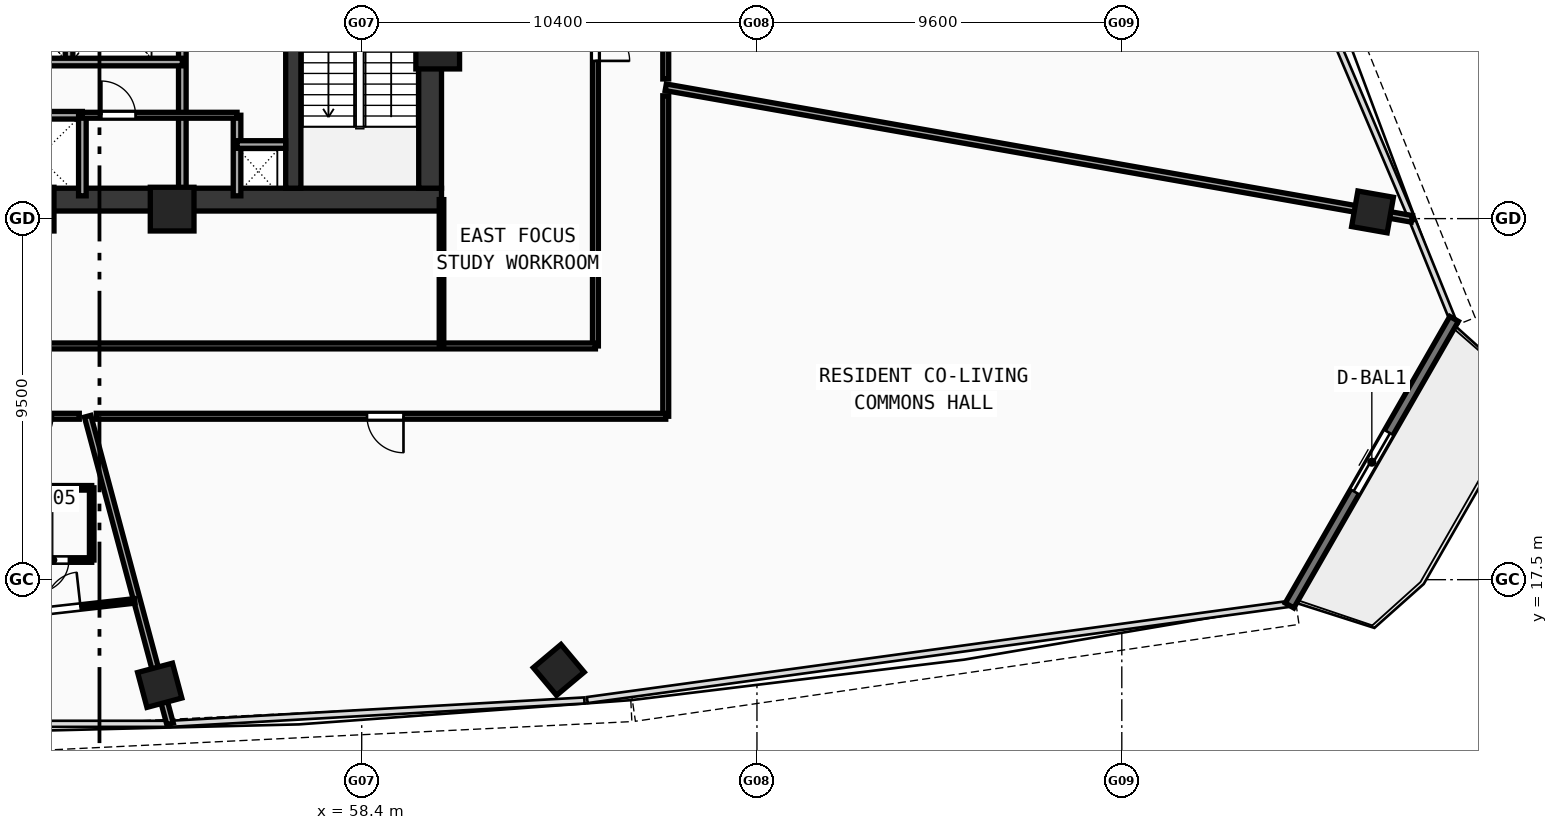
"""IFC4 building model, lengths in metres.
Left out: names, types, materials, properties, quantities, classifications, styles, units other than length and angle.
Written with IfcOpenShell. Run it as: python <this file> out.ifc"""

import sys

from ifc_helpers import new_model, si_unit, direction, frame, frame_2d, origin, origin_with_axes, origin_2d, place, context, subcontext, project, spatial, rectangle, hollow_rectangle, extrude, source, transform, mapped, element, fill, save


model = new_model("IFC4")
c1 = context("Model", 3, precision=1e-05, world=origin(), true_north=direction((0.0, 1.0)))
c2 = subcontext(c1, "Body", "Model", "MODEL_VIEW")
j1 = project(units=[si_unit("LENGTHUNIT", "METRE"), si_unit("PLANEANGLEUNIT", "RADIAN")], contexts=[c1])
p1 = place(None, origin())
s1 = spatial("IfcSite", under=j1, at=p1, CompositionType="ELEMENT")
p2 = place(p1, origin())
s2 = spatial("IfcBuilding", under=s1, at=p2, CompositionType="ELEMENT")
p3 = place(p2, frame((0.0, 0.0, 170.31)))
s3 = spatial("IfcBuildingStorey", under=s2, at=p3, CompositionType="ELEMENT", Elevation=170.31)
p4 = place(p3, frame((35.5, 27.5, 0.0), z_axis=(0.0, 0.0, 1.0), x_axis=(1.0, 0.0, 0.0)))
e1 = element("IfcWall", 1, at=p4, inside=s3, PredefinedType="SHEAR", context=c2, shape_type="SweptSolid", body=[
    extrude(rectangle(XDim=25.0, YDim=0.6, at=frame_2d((12.5, 0.0))), origin(), (0.0, 0.0, 1.0), 5.57),
])
p5 = place(p3, frame((60.2, 27.8, 0.0), z_axis=(0.0, 0.0, 1.0), x_axis=(0.0, 1.0, 0.0)))
e2 = element("IfcWall", 2, at=p5, inside=s3, PredefinedType="SHEAR", context=c2, shape_type="SweptSolid", body=[
    extrude(rectangle(XDim=12.1, YDim=0.6, at=frame_2d((6.05, 0.0))), origin(), (0.0, 0.0, 1.0), 5.57),
])
p6 = place(p3, frame((56.6, 27.8, 0.0), z_axis=(0.0, 0.0, 1.0), x_axis=(0.0, 1.0, 0.0)))
e3 = element("IfcWall", 3, at=p6, inside=s3, PredefinedType="SHEAR", context=c2, shape_type="SweptSolid", body=[
    extrude(rectangle(XDim=12.1, YDim=0.4, at=frame_2d((6.05, 0.0))), origin(), (0.0, 0.0, 1.0), 5.57),
])
p7 = place(p6, frame((9.95, 0.0, 0.0)))
e4 = element("IfcOpeningElement", 4, at=p7, cuts=e3, PredefinedType="OPENING", context=c2, shape_type="SweptSolid", body=[
    extrude(rectangle(XDim=1.1, YDim=2.1, at=frame_2d((0.55, 1.05))), frame((0.0, 0.21, 0.0), z_axis=(0.0, -1.0, 0.0), x_axis=(1.0, 0.0, 0.0)), (0.0, 0.0, 1.0), 0.42),
])
m1 = source(origin(), c2, "Body", "SweptSolid", [
    extrude(hollow_rectangle(XDim=1.15, YDim=1.15, WallThickness=0.048, at=origin_2d()), origin(), (0.0, 0.0, 1.0), 5.83),
])
for number, where, z_axis, x_axis in (
    (5, (49.729, 27.25, -0.26), (0.0, 0.0, 1.0), (1.0, 0.0, 0.0)),
    (6, (53.412, 27.25, -0.26), (0.0, 0.0, 1.0), (1.0, 0.0, 0.0)),
    (7, (60.4, 31.513, -0.26), (0.0, 0.0, 1.0), (1.0, 0.0, 0.0)),
):
    element("IfcColumn", number, at=place(p3, frame(where, z_axis=z_axis, x_axis=x_axis)), inside=s3, PredefinedType="COLUMN", context=c2, shape_type="MappedRepresentation", body=[
        mapped(m1, transform((0.0, 0.0, 0.0), scale=1.0)),
    ])
m2 = source(origin(), c2, "Body", "SweptSolid", [
    extrude(hollow_rectangle(XDim=0.95, YDim=0.95, WallThickness=0.04, at=origin_2d()), origin(), (0.0, 0.0, 1.0), 5.83),
])
for number, where, z_axis, x_axis in (
    (8, (53.085, 14.722, -0.26), (0.0, 0.0, 1.0), (0.966, 0.259, 0.0)),
    (9, (63.585, 15.126, -0.26), (0.0, 0.0, 1.0), (0.766, 0.643, 0.0)),
    (10, (84.997, 27.177, -0.26), (0.0, 0.0, 1.0), (0.174, 0.985, 0.0)),
):
    element("IfcColumn", number, at=place(p3, frame(where, z_axis=z_axis, x_axis=x_axis)), inside=s3, PredefinedType="COLUMN", context=c2, shape_type="MappedRepresentation", body=[
        mapped(m2, transform((0.0, 0.0, 0.0), scale=1.0)),
    ])
p8 = place(p3, frame((82.814, 16.821, 0.0), z_axis=(0.0, 0.0, 1.0), x_axis=(0.497939858886, 0.867211564114, 0.0)))
e11 = element("IfcWall", 11, at=p8, inside=s3, PredefinedType="STANDARD", context=c2, shape_type="SweptSolid", body=[
    extrude(rectangle(XDim=8.696, YDim=0.26, at=frame_2d((4.348, 0.0))), origin(), (0.0, 0.0, 1.0), 5.57),
])
p9 = place(p8, frame((3.448, 0.0, 0.0)))
e12 = element("IfcOpeningElement", 12, at=p9, cuts=e11, PredefinedType="OPENING", context=c2, shape_type="SweptSolid", body=[
    extrude(rectangle(XDim=1.8, YDim=2.15, at=frame_2d((0.9, 1.075))), frame((0.0, 0.14, 0.0), z_axis=(0.0, -1.0, 0.0), x_axis=(1.0, 0.0, 0.0)), (0.0, 0.0, 1.0), 0.28),
])
p10 = place(p3, frame((53.68, 27.6, 0.0), z_axis=(0.0, 0.0, 1.0), x_axis=(0.0, 1.0, 0.0)))
e13 = element("IfcWall", 13, at=p10, inside=s3, PredefinedType="SOLIDWALL", context=c2, shape_type="SweptSolid", body=[
    extrude(rectangle(XDim=9.05, YDim=0.2, at=frame_2d((4.525, 0.0))), origin(), (0.0, 0.0, 1.0), 2.22),
])
p11 = place(p10, frame((6.9, 0.0, 0.0)))
e14 = element("IfcOpeningElement", 14, at=p11, cuts=e13, PredefinedType="OPENING", context=c2, shape_type="SweptSolid", body=[
    extrude(rectangle(XDim=1.05, YDim=2.1, at=frame_2d((0.525, 1.05))), frame((0.0, 0.11, 0.0), z_axis=(0.0, -1.0, 0.0), x_axis=(1.0, 0.0, 0.0)), (0.0, 0.0, 1.0), 0.22),
])
p12 = place(p3, frame((50.7, 31.12, 0.0), z_axis=(0.0, 0.0, 1.0), x_axis=(0.0, 1.0, 0.0)))
e15 = element("IfcWall", 15, at=p12, inside=s3, PredefinedType="SOLIDWALL", context=c2, shape_type="SweptSolid", body=[
    extrude(rectangle(XDim=2.7, YDim=0.2, at=frame_2d((1.35, 0.0))), origin(), (0.0, 0.0, 1.0), 5.57),
])
p13 = place(p3, frame((43.85, 29.72, 0.0), z_axis=(0.0, 0.0, 1.0), x_axis=(1.0, 0.0, 0.0)))
e16 = element("IfcWall", 16, at=p13, inside=s3, PredefinedType="SOLIDWALL", context=c2, shape_type="SweptSolid", body=[
    extrude(rectangle(XDim=7.2, YDim=0.2, at=frame_2d((3.6, 0.0))), origin(), (0.0, 0.0, 1.0), 5.57),
])
p14 = place(p3, frame((51.05, 27.6, 0.0), z_axis=(0.0, 0.0, 1.0), x_axis=(0.0, 1.0, 0.0)))
e17 = element("IfcWall", 17, at=p14, inside=s3, PredefinedType="SOLIDWALL", context=c2, shape_type="SweptSolid", body=[
    extrude(rectangle(XDim=2.12, YDim=0.2, at=frame_2d((1.06, 0.0))), origin(), (0.0, 0.0, 1.0), 5.57),
])
p15 = place(p3, frame((43.85, 31.12, 0.0), z_axis=(0.0, 0.0, 1.0), x_axis=(1.0, 0.0, 0.0)))
e18 = element("IfcWall", 18, at=p15, inside=s3, PredefinedType="SOLIDWALL", context=c2, shape_type="SweptSolid", body=[
    extrude(rectangle(XDim=9.83, YDim=0.2, at=frame_2d((4.915, 0.0))), origin(), (0.0, 0.0, 1.0), 5.57),
])
p16 = place(p3, frame((55.12, 27.6, 0.0), z_axis=(0.0, 0.0, 1.0), x_axis=(0.0, 1.0, 0.0)))
e19 = element("IfcWall", 19, at=p16, inside=s3, PredefinedType="SOLIDWALL", context=c2, shape_type="SweptSolid", body=[
    extrude(rectangle(XDim=2.12, YDim=0.2, at=frame_2d((1.06, 0.0))), origin(), (0.0, 0.0, 1.0), 5.57),
])
p17 = place(p3, frame((55.12, 28.95, 0.0), z_axis=(0.0, 0.0, 1.0), x_axis=(1.0, 0.0, 0.0)))
e20 = element("IfcWall", 20, at=p17, inside=s3, PredefinedType="SOLIDWALL", context=c2, shape_type="SweptSolid", body=[
    extrude(rectangle(XDim=1.28, YDim=0.2, at=frame_2d((0.64, 0.0))), origin(), (0.0, 0.0, 1.0), 5.57),
])
p18 = place(p3, frame((51.05, 29.72, 0.0), z_axis=(0.0, 0.0, 1.0), x_axis=(1.0, 0.0, 0.0)))
e21 = element("IfcWall", 21, at=p18, inside=s3, PredefinedType="PARTITIONING", context=c2, shape_type="SweptSolid", body=[
    extrude(rectangle(XDim=4.07, YDim=0.155, at=frame_2d((2.035, 0.0))), origin(), (0.0, 0.0, 1.0), 5.57),
])
p19 = place(p18, frame((0.5, 0.0, 0.0)))
e22 = element("IfcOpeningElement", 22, at=p19, cuts=e21, PredefinedType="OPENING", context=c2, shape_type="SweptSolid", body=[
    extrude(rectangle(XDim=0.9, YDim=2.1, at=frame_2d((0.45, 1.05))), frame((0.0, 0.087, 0.0), z_axis=(0.0, -1.0, 0.0), x_axis=(1.0, 0.0, 0.0)), (0.0, 0.0, 1.0), 0.175),
])
p20 = place(p3, frame((64.55, 23.65, 0.0), z_axis=(0.0, 0.0, 1.0), x_axis=(0.0, 1.0, 0.0)))
e23 = element("IfcWall", 23, at=p20, inside=s3, PredefinedType="PARTITIONING", context=c2, shape_type="SweptSolid", body=[
    extrude(rectangle(XDim=16.6, YDim=0.155, at=frame_2d((8.3, 0.0))), origin(), (0.0, 0.0, 1.0), 2.22),
])
p21 = place(p20, frame((7.5, 0.0, 0.0)))
e24 = element("IfcOpeningElement", 24, at=p21, cuts=e23, PredefinedType="OPENING", context=c2, shape_type="SweptSolid", body=[
    extrude(rectangle(XDim=0.9, YDim=2.08, at=frame_2d((0.45, 1.04))), frame((0.0, 0.087, 0.0), z_axis=(0.0, -1.0, 0.0), x_axis=(1.0, 0.0, 0.0)), (0.0, 0.0, 1.0), 0.175),
])
p22 = place(p3, frame((31.45, 23.65, 0.0), z_axis=(0.0, 0.0, 1.0), x_axis=(1.0, 0.0, 0.0)))
e25 = element("IfcWall", 25, at=p22, inside=s3, PredefinedType="PARTITIONING", context=c2, shape_type="SweptSolid", body=[
    extrude(rectangle(XDim=33.1, YDim=0.155, at=frame_2d((16.55, 0.0))), origin(), (0.0, 0.0, 1.0), 2.22),
])
p23 = place(p22, frame((16.0, 0.0, 0.0)))
e26 = element("IfcOpeningElement", 26, at=p23, cuts=e25, PredefinedType="OPENING", context=c2, shape_type="SweptSolid", body=[
    extrude(rectangle(XDim=0.92, YDim=2.1, at=frame_2d((0.46, 1.05))), frame((0.0, 0.087, 0.0), z_axis=(0.0, -1.0, 0.0), x_axis=(1.0, 0.0, 0.0)), (0.0, 0.0, 1.0), 0.175),
])
p24 = place(p3, frame((60.5, 23.65, 0.0), z_axis=(0.0, 0.0, 1.0), x_axis=(0.0, 1.0, 0.0)))
e27 = element("IfcWall", 27, at=p24, inside=s3, PredefinedType="PARTITIONING", context=c2, shape_type="SweptSolid", body=[
    extrude(rectangle(XDim=3.85, YDim=0.12, at=frame_2d((1.925, 0.0))), origin(), (0.0, 0.0, 1.0), 5.17),
])
p25 = place(p3, frame((51.189, 21.8, 0.0), z_axis=(0.0, 0.0, 1.0), x_axis=(0.258819593461, -0.965925679357, 0.0)))
e28 = element("IfcWall", 28, at=p25, inside=s3, PredefinedType="PARTITIONING", context=c2, shape_type="SweptSolid", body=[
    extrude(rectangle(XDim=8.378, YDim=0.175, at=frame_2d((4.189, 0.0))), origin(), (0.0, 0.0, 1.0), 2.22),
])
p26 = place(p3, frame((66.4, 30.456, 0.0), z_axis=(0.0, 0.0, 1.0), x_axis=(0.984808700761, -0.173642802629, 0.0)))
e29 = element("IfcWall", 29, at=p26, inside=s3, PredefinedType="PARTITIONING", context=c2, shape_type="SweptSolid", body=[
    extrude(rectangle(XDim=19.934, YDim=0.175, at=frame_2d((9.967, 0.0))), origin(), (0.0, 0.0, 1.0), 2.22),
])
p27 = place(p3, frame((66.4, 34.767, 0.0), z_axis=(0.0, 0.0, 1.0), x_axis=(0.0, -1.0, 0.0)))
e30 = element("IfcWall", 30, at=p27, inside=s3, PredefinedType="PARTITIONING", context=c2, shape_type="SweptSolid", body=[
    extrude(rectangle(XDim=4.092, YDim=0.155, at=frame_2d((2.046, 0.0))), origin(), (0.0, 0.0, 1.0), 2.22),
])
p28 = place(p27, frame((1.571, 0.0, 0.0)))
e31 = element("IfcOpeningElement", 31, at=p28, cuts=e30, PredefinedType="OPENING", context=c2, shape_type="SweptSolid", body=[
    extrude(rectangle(XDim=0.96, YDim=2.12, at=frame_2d((0.48, 1.06))), frame((0.0, 0.087, 0.0), z_axis=(0.0, -1.0, 0.0), x_axis=(1.0, 0.0, 0.0)), (0.0, 0.0, 1.0), 0.175),
])
p29 = place(p3, frame((66.4, 30.232, 0.0), z_axis=(0.0, 0.0, 1.0), x_axis=(0.0, -1.0, 0.0)))
e32 = element("IfcWall", 32, at=p29, inside=s3, PredefinedType="PARTITIONING", context=c2, shape_type="SweptSolid", body=[
    extrude(rectangle(XDim=8.432, YDim=0.155, at=frame_2d((4.216, 0.0))), origin(), (0.0, 0.0, 1.0), 2.22),
])
p30 = place(p3, frame((66.4, 21.8, 0.0), z_axis=(0.0, 0.0, 1.0), x_axis=(-1.0, 0.0, 0.0)))
e33 = element("IfcWall", 33, at=p30, inside=s3, PredefinedType="PARTITIONING", context=c2, shape_type="SweptSolid", body=[
    extrude(rectangle(XDim=14.983, YDim=0.155, at=frame_2d((7.492, 0.0))), origin(), (0.0, 0.0, 1.0), 2.22),
])
p31 = place(p30, frame((6.901, 0.0, 0.0)))
e34 = element("IfcOpeningElement", 34, at=p31, cuts=e33, PredefinedType="OPENING", context=c2, shape_type="SweptSolid", body=[
    extrude(rectangle(XDim=0.96, YDim=2.12, at=frame_2d((0.48, 1.06))), frame((0.0, 0.087, 0.0), z_axis=(0.0, -1.0, 0.0), x_axis=(1.0, 0.0, 0.0)), (0.0, 0.0, 1.0), 0.175),
])
p32 = place(p3, frame((50.969, 21.8, 0.0), z_axis=(0.0, 0.0, 1.0), x_axis=(-1.0, 0.0, 0.0)))
e35 = element("IfcWall", 35, at=p32, inside=s3, PredefinedType="PARTITIONING", context=c2, shape_type="SweptSolid", body=[
    extrude(rectangle(XDim=2.333, YDim=0.155, at=frame_2d((1.167, 0.0))), origin(), (0.0, 0.0, 1.0), 2.22),
])
p33 = place(p32, frame((0.692, 0.0, 0.0)))
e36 = element("IfcOpeningElement", 36, at=p33, cuts=e35, PredefinedType="OPENING", context=c2, shape_type="SweptSolid", body=[
    extrude(rectangle(XDim=0.96, YDim=2.12, at=frame_2d((0.48, 1.06))), frame((0.0, 0.087, 0.0), z_axis=(0.0, -1.0, 0.0), x_axis=(1.0, 0.0, 0.0)), (0.0, 0.0, 1.0), 0.175),
])
p34 = place(p3, frame((49.246, 18.017, 0.0), z_axis=(0.0, 0.0, 1.0), x_axis=(1.0, 0.0, 0.0)))
e37 = element("IfcWall", 37, at=p34, inside=s3, PredefinedType="PARTITIONING", context=c2, shape_type="SweptSolid", body=[
    extrude(rectangle(XDim=2.05, YDim=0.12, at=frame_2d((1.025, 0.0))), origin(), (0.0, 0.0, 1.0), 5.57),
])
p35 = place(p34, frame((0.6, 0.0, 0.0)))
e38 = element("IfcOpeningElement", 38, at=p35, cuts=e37, PredefinedType="OPENING", context=c2, shape_type="SweptSolid", body=[
    extrude(rectangle(XDim=0.85, YDim=2.1, at=frame_2d((0.425, 1.05))), frame((0.0, 0.07, 0.0), z_axis=(0.0, -1.0, 0.0), x_axis=(1.0, 0.0, 0.0)), (0.0, 0.0, 1.0), 0.14),
])
p36 = place(p3, frame((51.296, 18.017, 0.0), z_axis=(0.0, 0.0, 1.0), x_axis=(0.0, 1.0, 0.0)))
e39 = element("IfcWall", 39, at=p36, inside=s3, PredefinedType="PARTITIONING", context=c2, shape_type="SweptSolid", body=[
    extrude(rectangle(XDim=1.9, YDim=0.12, at=frame_2d((0.95, 0.0))), origin(), (0.0, 0.0, 1.0), 2.22),
])
p37 = place(p3, frame((51.296, 19.917, 0.0), z_axis=(0.0, 0.0, 1.0), x_axis=(-1.0, 0.0, 0.0)))
e40 = element("IfcWall", 40, at=p37, inside=s3, PredefinedType="PARTITIONING", context=c2, shape_type="SweptSolid", body=[
    extrude(rectangle(XDim=2.05, YDim=0.12, at=frame_2d((1.025, 0.0))), origin(), (0.0, 0.0, 1.0), 2.22),
])
p38 = place(p3, frame((48.66, 16.518, 0.0), z_axis=(0.0, 0.0, 1.0), x_axis=(0.993740790244, 0.111710526829, 0.0)))
e41 = element("IfcWall", 41, at=p38, inside=s3, PredefinedType="PARTITIONING", context=c2, shape_type="SweptSolid", body=[
    extrude(rectangle(XDim=3.792, YDim=0.12, at=frame_2d((1.896, 0.0))), origin(), (0.0, 0.0, 1.0), 2.22),
])
p39 = place(p38, frame((1.436, 0.0, 0.0)))
e42 = element("IfcOpeningElement", 42, at=p39, cuts=e41, PredefinedType="OPENING", context=c2, shape_type="SweptSolid", body=[
    extrude(rectangle(XDim=0.92, YDim=2.1, at=frame_2d((0.46, 1.05))), frame((0.0, 0.07, 0.0), z_axis=(0.0, -1.0, 0.0), x_axis=(1.0, 0.0, 0.0)), (0.0, 0.0, 1.0), 0.14),
])
m3 = source(origin(), c2, "Body", "SweptSolid", [
    extrude(rectangle(XDim=1.8, YDim=2.15, at=frame_2d((0.9, 1.075))), frame((0.0, 0.025, 0.0), z_axis=(0.0, -1.0, 0.0), x_axis=(1.0, 0.0, 0.0)), (0.0, 0.0, 1.0), 0.05),
])
p40 = place(p9, origin_with_axes())
e43 = element("IfcDoor", 43, at=p40, inside=s3, OperationType="DOUBLE_DOOR_SLIDING", PredefinedType="DOOR", context=c2, shape_type="MappedRepresentation", body=[
    mapped(m3, transform((0.0, 0.0, 0.0), scale=1.0)),
])
fill(e12, e43)
m4 = source(origin(), c2, "Body", "SweptSolid", [
    extrude(rectangle(XDim=0.9, YDim=2.1, at=frame_2d((0.45, 1.05))), frame((0.0, 0.025, 0.0), z_axis=(0.0, -1.0, 0.0), x_axis=(1.0, 0.0, 0.0)), (0.0, 0.0, 1.0), 0.05),
])
p41 = place(p19, origin_with_axes())
e44 = element("IfcDoor", 44, at=p41, inside=s3, OperationType="SINGLE_SWING_LEFT", PredefinedType="DOOR", context=c2, shape_type="MappedRepresentation", body=[
    mapped(m4, transform((0.0, 0.0, 0.0), scale=1.0)),
])
fill(e22, e44)
m5 = source(origin(), c2, "Body", "SweptSolid", [
    extrude(rectangle(XDim=0.9, YDim=2.08, at=frame_2d((0.45, 1.04))), frame((0.0, 0.025, 0.0), z_axis=(0.0, -1.0, 0.0), x_axis=(1.0, 0.0, 0.0)), (0.0, 0.0, 1.0), 0.05),
])
p42 = place(p21, frame((0.9, 0.0, 0.0), z_axis=(0.0, 0.0, 1.0), x_axis=(-1.0, 0.0, 0.0)))
e45 = element("IfcDoor", 45, at=p42, inside=s3, OperationType="SINGLE_SWING_RIGHT", PredefinedType="DOOR", context=c2, shape_type="MappedRepresentation", body=[
    mapped(m5, transform((0.0, 0.0, 0.0), scale=1.0)),
])
fill(e24, e45)
m6 = source(origin(), c2, "Body", "SweptSolid", [
    extrude(rectangle(XDim=0.96, YDim=2.12, at=frame_2d((0.48, 1.06))), frame((0.0, 0.025, 0.0), z_axis=(0.0, -1.0, 0.0), x_axis=(1.0, 0.0, 0.0)), (0.0, 0.0, 1.0), 0.05),
])
p43 = place(p33, origin_with_axes())
e46 = element("IfcDoor", 46, at=p43, inside=s3, OperationType="SINGLE_SWING_RIGHT", PredefinedType="DOOR", context=c2, shape_type="MappedRepresentation", body=[
    mapped(m6, transform((0.0, 0.0, 0.0), scale=1.0)),
])
fill(e36, e46)
m7 = source(origin(), c2, "Body", "SweptSolid", [
    extrude(rectangle(XDim=0.85, YDim=2.1, at=frame_2d((0.425, 1.05))), frame((0.0, 0.025, 0.0), z_axis=(0.0, -1.0, 0.0), x_axis=(1.0, 0.0, 0.0)), (0.0, 0.0, 1.0), 0.05),
])
p44 = place(p35, frame((0.85, 0.0, 0.0), z_axis=(0.0, 0.0, 1.0), x_axis=(-1.0, 0.0, 0.0)))
e47 = element("IfcDoor", 47, at=p44, inside=s3, OperationType="SINGLE_SWING_RIGHT", PredefinedType="DOOR", context=c2, shape_type="MappedRepresentation", body=[
    mapped(m7, transform((0.0, 0.0, 0.0), scale=1.0)),
])
fill(e38, e47)
m8 = source(origin(), c2, "Body", "SweptSolid", [
    extrude(rectangle(XDim=0.92, YDim=2.1, at=frame_2d((0.46, 1.05))), frame((0.0, 0.025, 0.0), z_axis=(0.0, -1.0, 0.0), x_axis=(1.0, 0.0, 0.0)), (0.0, 0.0, 1.0), 0.05),
])
p45 = place(p39, origin_with_axes())
e48 = element("IfcDoor", 48, at=p45, inside=s3, OperationType="SINGLE_SWING_RIGHT", PredefinedType="DOOR", context=c2, shape_type="MappedRepresentation", body=[
    mapped(m8, transform((0.0, 0.0, 0.0), scale=1.0)),
])
fill(e42, e48)
p46 = place(p31, origin_with_axes())
e49 = element("IfcDoor", 49, at=p46, inside=s3, OperationType="SINGLE_SWING_LEFT", PredefinedType="DOOR", context=c2, shape_type="MappedRepresentation", body=[
    mapped(m6, transform((0.0, 0.0, 0.0), scale=1.0)),
])
fill(e34, e49)
save(model, sys.argv[1])
